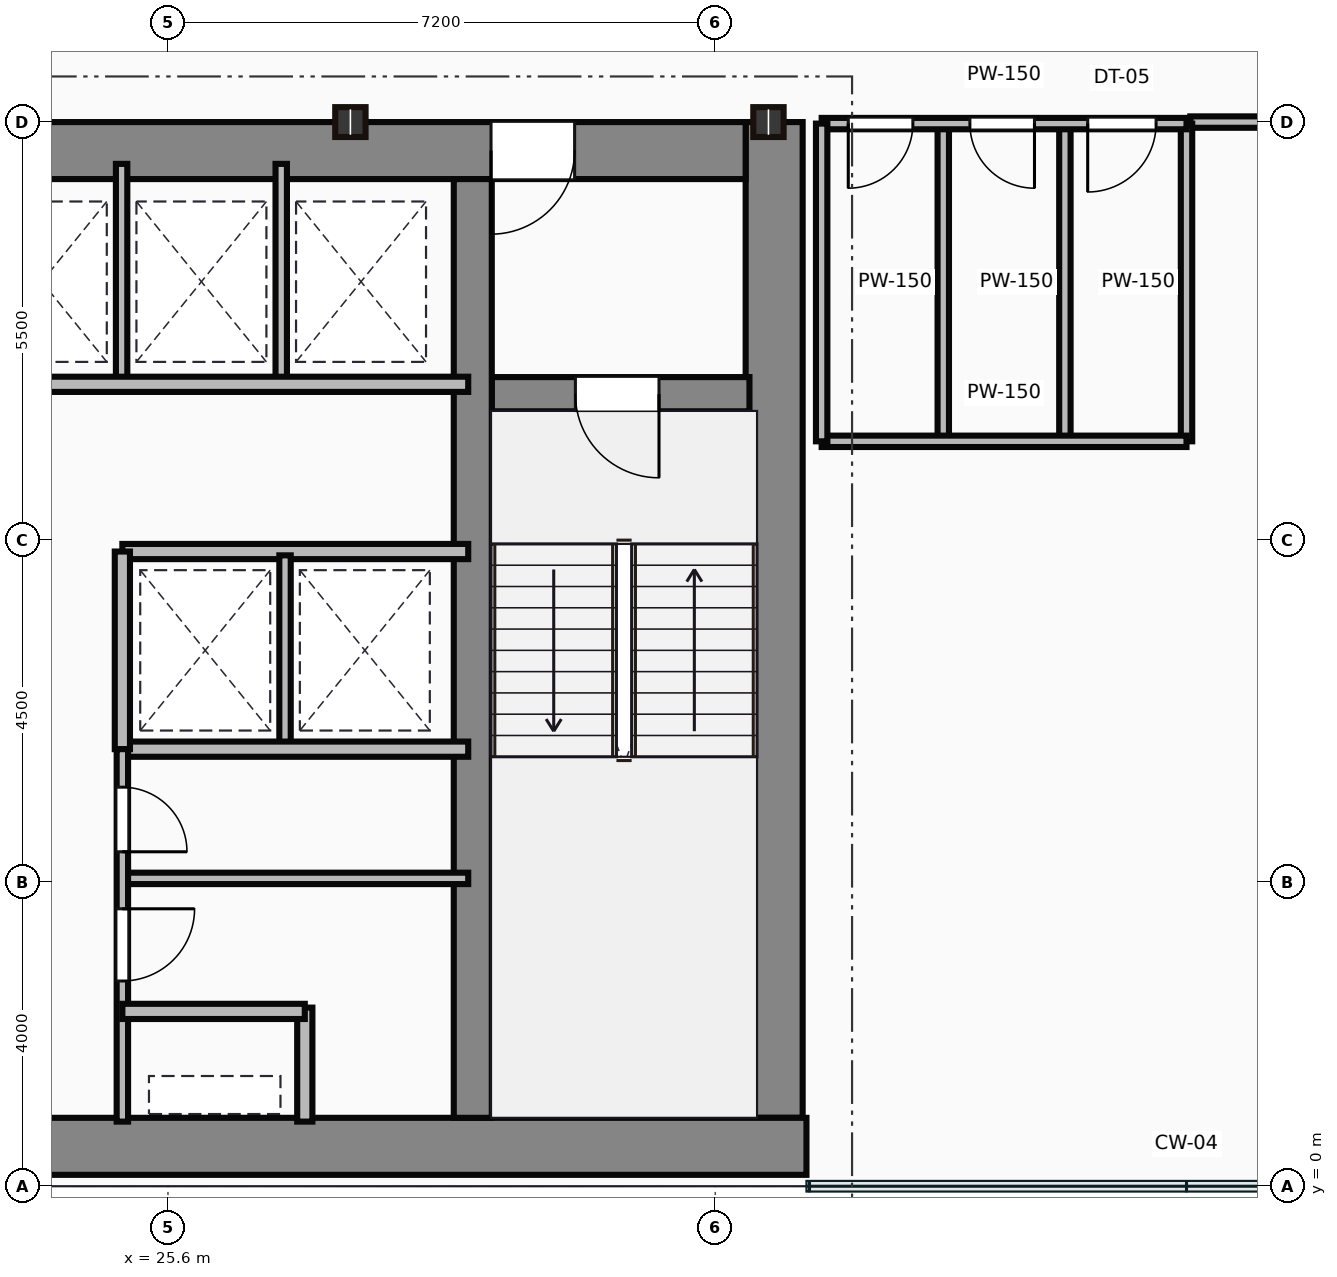
"""IFC4 building model, lengths in metres.
Left out: names, types, materials, properties, quantities, classifications, styles, units other than length and angle.
Written with IfcOpenShell. Run it as: python <this file> out.ifc"""

import sys

from ifc_helpers import new_model, si_unit, direction, frame, frame_2d, origin, origin_2d, place, context, subcontext, project, spatial, rectangle, i_section, extrude, source, transform, mapped, element, fill, save


model = new_model("IFC4")
c1 = context("Model", 3, precision=1e-05, world=origin(), true_north=direction((0.0, 1.0)))
c2 = subcontext(c1, "Body", "Model", "MODEL_VIEW")
j1 = project(units=[si_unit("LENGTHUNIT", "METRE"), si_unit("PLANEANGLEUNIT", "RADIAN")], contexts=[c1])
p1 = place(None, origin())
s1 = spatial("IfcSite", under=j1, at=p1, CompositionType="ELEMENT")
p2 = place(p1, origin())
s2 = spatial("IfcBuilding", under=s1, at=p2, CompositionType="ELEMENT")
p3 = place(p2, frame((0.0, 0.0, 132.45)))
s3 = spatial("IfcBuildingStorey", under=s2, at=p3, CompositionType="ELEMENT", Elevation=132.45)
m1 = source(origin(), c2, "Body", "SweptSolid", [
    extrude(rectangle(XDim=29.5, YDim=0.75, at=frame_2d((14.75, 0.0))), origin(), (0.0, 0.0, 1.0), 3.65),
])
p4 = place(p3, frame((4.5, 0.525, 0.0), z_axis=(0.0, 0.0, 1.0), x_axis=(1.0, 0.0, 0.0)))
e1 = element("IfcWall", 1, at=p4, inside=s3, PredefinedType="SHEAR", context=c2, shape_type="MappedRepresentation", body=[
    mapped(m1, transform((0.0, 0.0, 0.0))),
])
m2 = source(origin(), c2, "Body", "SweptSolid", [
    extrude(rectangle(XDim=13.1, YDim=0.75, at=frame_2d((6.55, 0.0))), origin(), (0.0, 0.0, 1.0), 3.65),
])
p5 = place(p3, frame((33.575, 0.9, 0.0), z_axis=(0.0, 0.0, 1.0), x_axis=(0.0, 1.0, 0.0)))
e2 = element("IfcWall", 2, at=p5, inside=s3, PredefinedType="SHEAR", context=c2, shape_type="MappedRepresentation", body=[
    mapped(m2, transform((0.0, 0.0, 0.0))),
])
m3 = source(origin(), c2, "Body", "SweptSolid", [
    extrude(rectangle(XDim=12.6, YDim=0.75, at=frame_2d((6.3, 0.0))), origin(), (0.0, 0.0, 1.0), 3.65),
])
p6 = place(p3, frame((20.6, 13.625, 0.0), z_axis=(0.0, 0.0, 1.0), x_axis=(1.0, 0.0, 0.0)))
e3 = element("IfcWall", 3, at=p6, inside=s3, PredefinedType="SHEAR", context=c2, shape_type="MappedRepresentation", body=[
    mapped(m3, transform((0.0, 0.0, 0.0))),
])
p7 = place(p6, frame((9.25, 0.0, 0.0)))
e4 = element("IfcOpeningElement", 4, at=p7, cuts=e3, PredefinedType="OPENING", context=c2, shape_type="SweptSolid", body=[
    extrude(rectangle(XDim=1.1, YDim=2.15, at=frame_2d((0.55, 1.075))), frame((0.0, 0.385, 0.0), z_axis=(0.0, -1.0, 0.0), x_axis=(1.0, 0.0, 0.0)), (0.0, 0.0, 1.0), 0.77),
])
m4 = source(origin(), c2, "Body", "SweptSolid", [
    extrude(rectangle(XDim=12.35, YDim=0.5, at=frame_2d((6.175, 0.0))), origin(), (0.0, 0.0, 1.0), 3.65),
])
p8 = place(p3, frame((29.61, 0.9, 0.0), z_axis=(0.0, 0.0, 1.0), x_axis=(0.0, 1.0, 0.0)))
e5 = element("IfcWall", 5, at=p8, inside=s3, PredefinedType="SHEAR", context=c2, shape_type="MappedRepresentation", body=[
    mapped(m4, transform((0.0, 0.0, 0.0))),
])
m5 = source(origin(), c2, "Body", "SweptSolid", [
    extrude(rectangle(XDim=3.39, YDim=0.45, at=frame_2d((1.695, 0.0))), origin(), (0.0, 0.0, 1.0), 3.65),
])
p9 = place(p3, frame((29.86, 10.42, 0.0), z_axis=(0.0, 0.0, 1.0), x_axis=(1.0, 0.0, 0.0)))
e6 = element("IfcWall", 6, at=p9, inside=s3, PredefinedType="SHEAR", context=c2, shape_type="MappedRepresentation", body=[
    mapped(m5, transform((0.0, 0.0, 0.0))),
])
p10 = place(p9, frame((1.1, 0.0, 0.0)))
e7 = element("IfcOpeningElement", 7, at=p10, cuts=e6, PredefinedType="OPENING", context=c2, shape_type="SweptSolid", body=[
    extrude(rectangle(XDim=1.1, YDim=2.15, at=frame_2d((0.55, 1.075))), frame((0.0, 0.235, 0.0), z_axis=(0.0, -1.0, 0.0), x_axis=(1.0, 0.0, 0.0)), (0.0, 0.0, 1.0), 0.47),
])
m6 = source(origin(), c2, "Body", "SweptSolid", [
    extrude(i_section(OverallWidth=0.399, OverallDepth=0.393, WebThickness=0.023, FlangeThickness=0.037, at=origin_2d()), origin(), (0.0, 0.0, 1.0), 3.65),
])
for number, where, z_axis, x_axis in (
    (8, (28.0, 14.0, 0.0), (0.0, 0.0, 1.0), (1.0, 0.0, 0.0)),
    (9, (33.5, 14.0, 0.0), (0.0, 0.0, 1.0), (1.0, 0.0, 0.0)),
):
    element("IfcColumn", number, at=place(p3, frame(where, z_axis=z_axis, x_axis=x_axis)), inside=s3, PredefinedType="COLUMN", context=c2, shape_type="MappedRepresentation", body=[
        mapped(m6, transform((0.0, 0.0, 0.0))),
    ])
m7 = source(origin(), c2, "Body", "SweptSolid", [
    extrude(rectangle(XDim=8.8, YDim=0.2, at=frame_2d((4.4, 0.0))), origin(), (0.0, 0.0, 1.0), 3.35),
])
p11 = place(p3, frame((20.75, 10.55, 0.0), z_axis=(0.0, 0.0, 1.0), x_axis=(1.0, 0.0, 0.0)))
e10 = element("IfcWall", 10, at=p11, inside=s3, PredefinedType="PARTITIONING", context=c2, shape_type="MappedRepresentation", body=[
    mapped(m7, transform((0.0, 0.0, 0.0))),
])
m8 = source(origin(), c2, "Body", "SweptSolid", [
    extrude(rectangle(XDim=2.85, YDim=0.15, at=frame_2d((1.425, 0.0))), origin(), (0.0, 0.0, 1.0), 3.35),
])
for number, where, z_axis, x_axis in (
    (11, (24.99, 10.6, 0.0), (0.0, 0.0, 1.0), (0.0, 1.0, 0.0)),
    (12, (27.09, 10.6, 0.0), (0.0, 0.0, 1.0), (0.0, 1.0, 0.0)),
):
    element("IfcWall", number, at=place(p3, frame(where, z_axis=z_axis, x_axis=x_axis)), inside=s3, PredefinedType="PARTITIONING", context=c2, shape_type="MappedRepresentation", body=[
        mapped(m8, transform((0.0, 0.0, 0.0))),
    ])
m9 = source(origin(), c2, "Body", "SweptSolid", [
    extrude(rectangle(XDim=4.55, YDim=0.2, at=frame_2d((2.275, 0.0))), origin(), (0.0, 0.0, 1.0), 3.35),
])
for number, where, z_axis, x_axis in (
    (13, (25.0, 8.35, 0.0), (0.0, 0.0, 1.0), (1.0, 0.0, 0.0)),
    (14, (25.0, 5.75, 0.0), (0.0, 0.0, 1.0), (1.0, 0.0, 0.0)),
):
    element("IfcWall", number, at=place(p3, frame(where, z_axis=z_axis, x_axis=x_axis)), inside=s3, PredefinedType="PARTITIONING", context=c2, shape_type="MappedRepresentation", body=[
        mapped(m9, transform((0.0, 0.0, 0.0))),
    ])
m10 = source(origin(), c2, "Body", "SweptSolid", [
    extrude(rectangle(XDim=2.6, YDim=0.2, at=frame_2d((1.3, 0.0))), origin(), (0.0, 0.0, 1.0), 3.35),
])
p12 = place(p3, frame((25.0, 5.75, 0.0), z_axis=(0.0, 0.0, 1.0), x_axis=(0.0, 1.0, 0.0)))
e15 = element("IfcWall", 15, at=p12, inside=s3, PredefinedType="PARTITIONING", context=c2, shape_type="MappedRepresentation", body=[
    mapped(m10, transform((0.0, 0.0, 0.0))),
])
m11 = source(origin(), c2, "Body", "SweptSolid", [
    extrude(rectangle(XDim=2.5, YDim=0.15, at=frame_2d((1.25, 0.0))), origin(), (0.0, 0.0, 1.0), 3.35),
])
p13 = place(p3, frame((27.14, 5.8, 0.0), z_axis=(0.0, 0.0, 1.0), x_axis=(0.0, 1.0, 0.0)))
e16 = element("IfcWall", 16, at=p13, inside=s3, PredefinedType="PARTITIONING", context=c2, shape_type="MappedRepresentation", body=[
    mapped(m11, transform((0.0, 0.0, 0.0))),
])
m12 = source(origin(), c2, "Body", "SweptSolid", [
    extrude(rectangle(XDim=4.9, YDim=0.15, at=frame_2d((2.45, 0.0))), origin(), (0.0, 0.0, 1.0), 3.35),
])
p14 = place(p3, frame((25.0, 0.85, 0.0), z_axis=(0.0, 0.0, 1.0), x_axis=(0.0, 1.0, 0.0)))
e17 = element("IfcWall", 17, at=p14, inside=s3, PredefinedType="PARTITIONING", context=c2, shape_type="MappedRepresentation", body=[
    mapped(m12, transform((0.0, 0.0, 0.0))),
])
p15 = place(p14, frame((1.85, 0.0, 0.0)))
e18 = element("IfcOpeningElement", 18, at=p15, cuts=e17, PredefinedType="OPENING", context=c2, shape_type="SweptSolid", body=[
    extrude(rectangle(XDim=0.95, YDim=2.15, at=frame_2d((0.475, 1.075))), frame((0.0, 0.085, 0.0), z_axis=(0.0, -1.0, 0.0), x_axis=(1.0, 0.0, 0.0)), (0.0, 0.0, 1.0), 0.17),
])
p16 = place(p14, frame((3.55, 0.0, 0.0)))
e19 = element("IfcOpeningElement", 19, at=p16, cuts=e17, PredefinedType="OPENING", context=c2, shape_type="SweptSolid", body=[
    extrude(rectangle(XDim=0.85, YDim=2.15, at=frame_2d((0.425, 1.075))), frame((0.0, 0.085, 0.0), z_axis=(0.0, -1.0, 0.0), x_axis=(1.0, 0.0, 0.0)), (0.0, 0.0, 1.0), 0.17),
])
m13 = source(origin(), c2, "Body", "SweptSolid", [
    extrude(rectangle(XDim=2.4, YDim=0.2, at=frame_2d((1.2, 0.0))), origin(), (0.0, 0.0, 1.0), 3.35),
])
p17 = place(p3, frame((25.0, 2.3, 0.0), z_axis=(0.0, 0.0, 1.0), x_axis=(1.0, 0.0, 0.0)))
e20 = element("IfcWall", 20, at=p17, inside=s3, PredefinedType="PARTITIONING", context=c2, shape_type="MappedRepresentation", body=[
    mapped(m13, transform((0.0, 0.0, 0.0))),
])
m14 = source(origin(), c2, "Body", "SweptSolid", [
    extrude(rectangle(XDim=1.5, YDim=0.2, at=frame_2d((0.75, 0.0))), origin(), (0.0, 0.0, 1.0), 3.35),
])
p18 = place(p3, frame((27.4, 0.85, 0.0), z_axis=(0.0, 0.0, 1.0), x_axis=(0.0, 1.0, 0.0)))
e21 = element("IfcWall", 21, at=p18, inside=s3, PredefinedType="PARTITIONING", context=c2, shape_type="MappedRepresentation", body=[
    mapped(m14, transform((0.0, 0.0, 0.0))),
])
m15 = source(origin(), c2, "Body", "SweptSolid", [
    extrude(rectangle(XDim=4.55, YDim=0.15, at=frame_2d((2.275, 0.0))), origin(), (0.0, 0.0, 1.0), 3.35),
])
p19 = place(p3, frame((25.0, 4.05, 0.0), z_axis=(0.0, 0.0, 1.0), x_axis=(1.0, 0.0, 0.0)))
e22 = element("IfcWall", 22, at=p19, inside=s3, PredefinedType="PARTITIONING", context=c2, shape_type="MappedRepresentation", body=[
    mapped(m15, transform((0.0, 0.0, 0.0))),
])
m16 = source(origin(), c2, "Body", "SweptSolid", [
    extrude(rectangle(XDim=4.8, YDim=0.15, at=frame_2d((2.4, 0.0))), origin(), (0.0, 0.0, 1.0), 2.652),
])
p20 = place(p3, frame((34.2, 13.98, 0.0), z_axis=(0.0, 0.0, 1.0), x_axis=(1.0, 0.0, 0.0)))
e23 = element("IfcWall", 23, at=p20, inside=s3, PredefinedType="PARTITIONING", context=c2, shape_type="MappedRepresentation", body=[
    mapped(m16, transform((0.0, 0.0, 0.0))),
])
p21 = place(p20, frame((0.35, 0.0, 0.0)))
e24 = element("IfcOpeningElement", 24, at=p21, cuts=e23, PredefinedType="OPENING", context=c2, shape_type="SweptSolid", body=[
    extrude(rectangle(XDim=0.85, YDim=2.1, at=frame_2d((0.425, 1.05))), frame((0.0, 0.085, 0.0), z_axis=(0.0, -1.0, 0.0), x_axis=(1.0, 0.0, 0.0)), (0.0, 0.0, 1.0), 0.17),
])
p22 = place(p20, frame((1.95, 0.0, 0.0)))
e25 = element("IfcOpeningElement", 25, at=p22, cuts=e23, PredefinedType="OPENING", context=c2, shape_type="SweptSolid", body=[
    extrude(rectangle(XDim=0.85, YDim=2.1, at=frame_2d((0.425, 1.05))), frame((0.0, 0.085, 0.0), z_axis=(0.0, -1.0, 0.0), x_axis=(1.0, 0.0, 0.0)), (0.0, 0.0, 1.0), 0.17),
])
p23 = place(p20, frame((3.5, 0.0, 0.0)))
e26 = element("IfcOpeningElement", 26, at=p23, cuts=e23, PredefinedType="OPENING", context=c2, shape_type="SweptSolid", body=[
    extrude(rectangle(XDim=0.9, YDim=2.1, at=frame_2d((0.45, 1.05))), frame((0.0, 0.085, 0.0), z_axis=(0.0, -1.0, 0.0), x_axis=(1.0, 0.0, 0.0)), (0.0, 0.0, 1.0), 0.17),
])
m17 = source(origin(), c2, "Body", "SweptSolid", [
    extrude(rectangle(XDim=4.8, YDim=0.15, at=frame_2d((2.4, 0.0))), origin(), (0.0, 0.0, 1.0), 3.35),
])
p24 = place(p3, frame((34.2, 9.8, 0.0), z_axis=(0.0, 0.0, 1.0), x_axis=(1.0, 0.0, 0.0)))
e27 = element("IfcWall", 27, at=p24, inside=s3, PredefinedType="PARTITIONING", context=c2, shape_type="MappedRepresentation", body=[
    mapped(m17, transform((0.0, 0.0, 0.0))),
])
m18 = source(origin(), c2, "Body", "SweptSolid", [
    extrude(rectangle(XDim=4.18, YDim=0.15, at=frame_2d((2.09, 0.0))), origin(), (0.0, 0.0, 1.0), 3.35),
])
for number, where, z_axis, x_axis in (
    (28, (39.0, 9.8, 0.0), (0.0, 0.0, 1.0), (0.0, 1.0, 0.0)),
    (29, (34.2, 9.8, 0.0), (0.0, 0.0, 1.0), (0.0, 1.0, 0.0)),
    (30, (35.8, 9.8, 0.0), (0.0, 0.0, 1.0), (0.0, 1.0, 0.0)),
    (31, (37.4, 9.8, 0.0), (0.0, 0.0, 1.0), (0.0, 1.0, 0.0)),
):
    element("IfcWall", number, at=place(p3, frame(where, z_axis=z_axis, x_axis=x_axis)), inside=s3, PredefinedType="PARTITIONING", context=c2, shape_type="MappedRepresentation", body=[
        mapped(m18, transform((0.0, 0.0, 0.0))),
    ])
m19 = source(origin(), c2, "Body", "SweptSolid", [
    extrude(rectangle(XDim=1.75, YDim=0.15, at=frame_2d((0.875, 0.0))), origin(), (0.0, 0.0, 1.0), 2.652),
])
p25 = place(p3, frame((40.8, 14.0, 0.0), z_axis=(0.0, 0.0, 1.0), x_axis=(-1.0, 0.0, 0.0)))
e32 = element("IfcWall", 32, at=p25, inside=s3, PredefinedType="PARTITIONING", context=c2, shape_type="MappedRepresentation", body=[
    mapped(m19, transform((0.0, 0.0, 0.0))),
])
m20 = source(origin(), c2, "Body", "SweptSolid", [
    extrude(rectangle(XDim=1.1, YDim=2.15, at=frame_2d((0.55, 1.075))), frame((0.0, 0.025, 0.0), z_axis=(0.0, -1.0, 0.0), x_axis=(1.0, 0.0, 0.0)), (0.0, 0.0, 1.0), 0.05),
])
p26 = place(p10, frame((1.1, 0.0, 0.0), z_axis=(0.0, 0.0, 1.0), x_axis=(-1.0, 0.0, 0.0)))
e33 = element("IfcDoor", 33, at=p26, inside=s3, OperationType="SINGLE_SWING_RIGHT", PredefinedType="DOOR", context=c2, shape_type="MappedRepresentation", body=[
    mapped(m20, transform((0.0, 0.0, 0.0))),
])
fill(e7, e33)
p27 = place(p7, origin())
e34 = element("IfcDoor", 34, at=p27, inside=s3, OperationType="SINGLE_SWING_LEFT", PredefinedType="DOOR", context=c2, shape_type="MappedRepresentation", body=[
    mapped(m20, transform((0.0, 0.0, 0.0))),
])
fill(e4, e34)
m21 = source(origin(), c2, "Body", "SweptSolid", [
    extrude(rectangle(XDim=0.95, YDim=2.15, at=frame_2d((0.475, 1.075))), frame((0.0, 0.025, 0.0), z_axis=(0.0, -1.0, 0.0), x_axis=(1.0, 0.0, 0.0)), (0.0, 0.0, 1.0), 0.05),
])
p28 = place(p15, origin())
e35 = element("IfcDoor", 35, at=p28, inside=s3, OperationType="SINGLE_SWING_RIGHT", PredefinedType="DOOR", context=c2, shape_type="MappedRepresentation", body=[
    mapped(m21, transform((0.0, 0.0, 0.0))),
])
fill(e18, e35)
m22 = source(origin(), c2, "Body", "SweptSolid", [
    extrude(rectangle(XDim=0.85, YDim=2.15, at=frame_2d((0.425, 1.075))), frame((0.0, 0.025, 0.0), z_axis=(0.0, -1.0, 0.0), x_axis=(1.0, 0.0, 0.0)), (0.0, 0.0, 1.0), 0.05),
])
p29 = place(p16, origin())
e36 = element("IfcDoor", 36, at=p29, inside=s3, OperationType="SINGLE_SWING_LEFT", PredefinedType="DOOR", context=c2, shape_type="MappedRepresentation", body=[
    mapped(m22, transform((0.0, 0.0, 0.0))),
])
fill(e19, e36)
m23 = source(origin(), c2, "Body", "SweptSolid", [
    extrude(rectangle(XDim=0.85, YDim=2.1, at=frame_2d((0.425, 1.05))), frame((0.0, 0.025, 0.0), z_axis=(0.0, -1.0, 0.0), x_axis=(1.0, 0.0, 0.0)), (0.0, 0.0, 1.0), 0.05),
])
p30 = place(p21, frame((0.85, 0.0, 0.0), z_axis=(0.0, 0.0, 1.0), x_axis=(-1.0, 0.0, 0.0)))
e37 = element("IfcDoor", 37, at=p30, inside=s3, OperationType="SINGLE_SWING_LEFT", PredefinedType="DOOR", context=c2, shape_type="MappedRepresentation", body=[
    mapped(m23, transform((0.0, 0.0, 0.0))),
])
fill(e24, e37)
p31 = place(p22, frame((0.85, 0.0, 0.0), z_axis=(0.0, 0.0, 1.0), x_axis=(-1.0, 0.0, 0.0)))
e38 = element("IfcDoor", 38, at=p31, inside=s3, OperationType="SINGLE_SWING_RIGHT", PredefinedType="DOOR", context=c2, shape_type="MappedRepresentation", body=[
    mapped(m23, transform((0.0, 0.0, 0.0))),
])
fill(e25, e38)
m24 = source(origin(), c2, "Body", "SweptSolid", [
    extrude(rectangle(XDim=0.9, YDim=2.1, at=frame_2d((0.45, 1.05))), frame((0.0, 0.025, 0.0), z_axis=(0.0, -1.0, 0.0), x_axis=(1.0, 0.0, 0.0)), (0.0, 0.0, 1.0), 0.05),
])
p32 = place(p23, frame((0.9, 0.0, 0.0), z_axis=(0.0, 0.0, 1.0), x_axis=(-1.0, 0.0, 0.0)))
e39 = element("IfcDoor", 39, at=p32, inside=s3, OperationType="SINGLE_SWING_LEFT", PredefinedType="DOOR", context=c2, shape_type="MappedRepresentation", body=[
    mapped(m24, transform((0.0, 0.0, 0.0))),
])
fill(e26, e39)
save(model, sys.argv[1])
